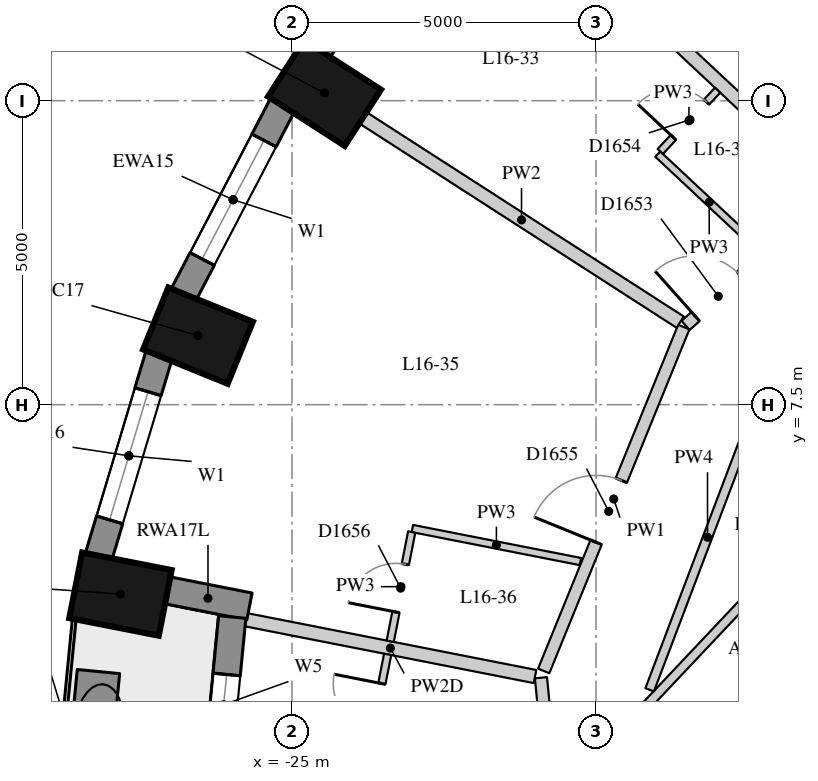
"""IFC4 building model, lengths in metres.
Left out: names, types, materials, properties, quantities, classifications, styles, units other than length and angle.
Written with IfcOpenShell. Run it as: python <this file> out.ifc"""

import sys

from ifc_helpers import new_model, si_unit, direction, frame, frame_2d, origin, origin_2d, place, context, subcontext, project, spatial, rectangle, extrude, element, fill, save


model = new_model("IFC4")
c1 = context("Model", 3, precision=1e-05, world=origin(), true_north=direction((0.0, 1.0)))
c2 = subcontext(c1, "Body", "Model", "MODEL_VIEW")
j1 = project(units=[si_unit("LENGTHUNIT", "METRE"), si_unit("PLANEANGLEUNIT", "RADIAN")], contexts=[c1])
p1 = place(None, origin())
s1 = spatial("IfcSite", under=j1, at=p1, CompositionType="ELEMENT")
p2 = place(p1, origin())
s2 = spatial("IfcBuilding", under=s1, at=p2, CompositionType="ELEMENT")
p3 = place(p2, frame((0.0, 0.0, 61.3)))
s3 = spatial("IfcBuildingStorey", under=s2, at=p3, CompositionType="ELEMENT", Elevation=61.3)
for number, where, z_axis, x_axis in (
    (1, (-24.465, 12.625, 0.0), (0.0, 0.0, 1.0), (-0.841, 0.541, 0.0)),
    (2, (-26.546, 8.636, 0.0), (0.0, 0.0, 1.0), (-0.927, 0.376, 0.0)),
    (3, (-27.821, 4.385, 0.0), (0.0, 0.0, 1.0), (-0.981, 0.193, 0.0)),
):
    element("IfcColumn", number, at=place(p3, frame(where, z_axis=z_axis, x_axis=x_axis)), inside=s3, PredefinedType="COLUMN", context=c2, shape_type="SweptSolid", body=[
        extrude(rectangle(XDim=1.5, YDim=1.1, at=origin_2d()), origin(), (0.0, 0.0, 1.0), 3.3),
    ])
p4 = place(p3, frame((-22.352, 16.17, 0.0), z_axis=(0.0, 0.0, 1.0), x_axis=(-0.616661975264, -0.787228053529, 0.0)))
e4 = element("IfcWall", 4, at=p4, inside=s3, PredefinedType="SOLIDWALL", context=c2, shape_type="SweptSolid", body=[
    extrude(rectangle(XDim=3.61, YDim=0.45, at=frame_2d((1.805, 0.0))), origin(), (0.0, 0.0, 1.0), 3.02),
])
p5 = place(p4, frame((0.705, 0.0, 0.4)))
e5 = element("IfcOpeningElement", 5, at=p5, cuts=e4, PredefinedType="OPENING", context=c2, shape_type="SweptSolid", body=[
    extrude(rectangle(XDim=2.2, YDim=1.75, at=frame_2d((1.1, 0.875))), frame((0.0, 0.235, 0.0), z_axis=(0.0, -1.0, 0.0), x_axis=(1.0, 0.0, 0.0)), (0.0, 0.0, 1.0), 0.47),
])
p6 = place(p3, frame((-25.152, 12.437, 0.0), z_axis=(0.0, 0.0, 1.0), x_axis=(-0.462492775226, -0.886623050041, 0.0)))
e6 = element("IfcWall", 6, at=p6, inside=s3, PredefinedType="SOLIDWALL", context=c2, shape_type="SweptSolid", body=[
    extrude(rectangle(XDim=3.532, YDim=0.45, at=frame_2d((1.766, 0.0))), origin(), (0.0, 0.0, 1.0), 3.02),
])
p7 = place(p6, frame((0.666, 0.0, 0.4)))
e7 = element("IfcOpeningElement", 7, at=p7, cuts=e6, PredefinedType="OPENING", context=c2, shape_type="SweptSolid", body=[
    extrude(rectangle(XDim=2.2, YDim=1.75, at=frame_2d((1.1, 0.875))), frame((0.0, 0.235, 0.0), z_axis=(0.0, -1.0, 0.0), x_axis=(1.0, 0.0, 0.0)), (0.0, 0.0, 1.0), 0.47),
])
p8 = place(p3, frame((-27.185, 8.323, 0.0), z_axis=(0.0, 0.0, 1.0), x_axis=(-0.287064133733, -0.957911364963, 0.0)))
e8 = element("IfcWall", 8, at=p8, inside=s3, PredefinedType="SOLIDWALL", context=c2, shape_type="SweptSolid", body=[
    extrude(rectangle(XDim=3.473, YDim=0.45, at=frame_2d((1.737, 0.0))), origin(), (0.0, 0.0, 1.0), 3.02),
])
p9 = place(p8, frame((0.637, 0.0, 0.4)))
e9 = element("IfcOpeningElement", 9, at=p9, cuts=e8, PredefinedType="OPENING", context=c2, shape_type="SweptSolid", body=[
    extrude(rectangle(XDim=2.2, YDim=1.75, at=frame_2d((1.1, 0.875))), frame((0.0, 0.235, 0.0), z_axis=(0.0, -1.0, 0.0), x_axis=(1.0, 0.0, 0.0)), (0.0, 0.0, 1.0), 0.47),
])
p10 = place(p3, frame((-27.064, 4.45, 0.0), z_axis=(0.0, 0.0, 1.0), x_axis=(0.98123042829, -0.192838913596, 0.0)))
e10 = element("IfcWall", 10, at=p10, inside=s3, PredefinedType="SOLIDWALL", context=c2, shape_type="SweptSolid", body=[
    extrude(rectangle(XDim=1.39, YDim=0.45, at=frame_2d((0.695, 0.0))), origin(), (0.0, 0.0, 1.0), 2.47),
])
p11 = place(p3, frame((-25.983, 4.008, 0.0), z_axis=(0.0, 0.0, 1.0), x_axis=(-0.097133468736, -0.995271364629, 0.0)))
e11 = element("IfcWall", 11, at=p11, inside=s3, PredefinedType="SOLIDWALL", context=c2, shape_type="SweptSolid", body=[
    extrude(rectangle(XDim=4.049, YDim=0.45, at=frame_2d((2.024, 0.0))), origin(), (0.0, 0.0, 1.0), 3.02),
])
p12 = place(p11, frame((0.949, 0.0, 0.4)))
e12 = element("IfcOpeningElement", 12, at=p12, cuts=e11, PredefinedType="OPENING", context=c2, shape_type="SweptSolid", body=[
    extrude(rectangle(XDim=1.0, YDim=1.75, at=frame_2d((0.5, 0.875))), frame((0.0, 0.235, 0.0), z_axis=(0.0, -1.0, 0.0), x_axis=(1.0, 0.0, 0.0)), (0.0, 0.0, 1.0), 0.47),
])
p13 = place(p11, frame((2.1, 0.0, 0.0)))
e13 = element("IfcOpeningElement", 13, at=p13, cuts=e11, PredefinedType="OPENING", context=c2, shape_type="SweptSolid", body=[
    extrude(rectangle(XDim=1.0, YDim=2.15, at=frame_2d((0.5, 1.075))), frame((0.0, 0.235, 0.0), z_axis=(0.0, -1.0, 0.0), x_axis=(1.0, 0.0, 0.0)), (0.0, 0.0, 1.0), 0.47),
])
p14 = place(p3, frame((-28.183, 3.111, 0.0), z_axis=(0.0, 0.0, 1.0), x_axis=(-0.097381768628, -0.995247100543, 0.0)))
e14 = element("IfcWall", 14, at=p14, inside=s3, PredefinedType="USERDEFINED", context=c2, shape_type="SweptSolid", body=[
    extrude(rectangle(XDim=1.8, YDim=0.7, at=frame_2d((0.9, 0.0))), origin(), (0.0, 0.0, 1.0), 0.75),
])
p15 = place(p3, frame((-20.034, -5.858, 0.0), z_axis=(0.0, 0.0, 1.0), x_axis=(-0.097894942705, 0.995196754513, 0.0)))
e15 = element("IfcWall", 15, at=p15, inside=s3, PredefinedType="PARTITIONING", context=c2, shape_type="SweptSolid", body=[
    extrude(rectangle(XDim=8.911, YDim=0.2, at=frame_2d((4.455, 0.0))), origin(), (0.0, 0.0, 1.0), 3.02),
])
p16 = place(p15, frame((5.565, 0.0, 0.0)))
e16 = element("IfcOpeningElement", 16, at=p16, cuts=e15, PredefinedType="OPENING", context=c2, shape_type="SweptSolid", body=[
    extrude(rectangle(XDim=1.1, YDim=2.1, at=frame_2d((0.55, 1.05))), frame((0.0, 0.11, 0.0), z_axis=(0.0, -1.0, 0.0), x_axis=(1.0, 0.0, 0.0)), (0.0, 0.0, 1.0), 0.22),
])
p17 = place(p15, frame((1.044, 0.0, 0.0)))
e17 = element("IfcOpeningElement", 17, at=p17, cuts=e15, PredefinedType="OPENING", context=c2, shape_type="SweptSolid", body=[
    extrude(rectangle(XDim=0.9, YDim=2.1, at=frame_2d((0.45, 1.05))), frame((0.0, 0.11, 0.0), z_axis=(0.0, -1.0, 0.0), x_axis=(1.0, 0.0, 0.0)), (0.0, 0.0, 1.0), 0.22),
])
p18 = place(p3, frame((-20.861, 3.121, 0.0), z_axis=(0.0, 0.0, 1.0), x_axis=(0.377214346955, 0.926125983034, 0.0)))
e18 = element("IfcWall", 18, at=p18, inside=s3, PredefinedType="PARTITIONING", context=c2, shape_type="SweptSolid", body=[
    extrude(rectangle(XDim=6.107, YDim=0.2, at=frame_2d((3.054, 0.0))), origin(), (0.0, 0.0, 1.0), 3.02),
])
p19 = place(p18, frame((2.285, 0.0, 0.0)))
e19 = element("IfcOpeningElement", 19, at=p19, cuts=e18, PredefinedType="OPENING", context=c2, shape_type="SweptSolid", body=[
    extrude(rectangle(XDim=1.1, YDim=2.1, at=frame_2d((0.55, 1.05))), frame((0.0, 0.11, 0.0), z_axis=(0.0, -1.0, 0.0), x_axis=(1.0, 0.0, 0.0)), (0.0, 0.0, 1.0), 0.22),
])
p20 = place(p3, frame((-18.527, 8.804, 0.0), z_axis=(0.0, 0.0, 1.0), x_axis=(0.746493000154, 0.665393267716, 0.0)))
e20 = element("IfcWall", 20, at=p20, inside=s3, PredefinedType="PARTITIONING", context=c2, shape_type="SweptSolid", body=[
    extrude(rectangle(XDim=3.251, YDim=0.2, at=frame_2d((1.625, 0.0))), origin(), (0.0, 0.0, 1.0), 3.02),
])
p21 = place(p20, frame((0.22, 0.0, 0.0)))
e21 = element("IfcOpeningElement", 21, at=p21, cuts=e20, PredefinedType="OPENING", context=c2, shape_type="SweptSolid", body=[
    extrude(rectangle(XDim=1.0, YDim=2.1, at=frame_2d((0.5, 1.05))), frame((0.0, 0.11, 0.0), z_axis=(0.0, -1.0, 0.0), x_axis=(1.0, 0.0, 0.0)), (0.0, 0.0, 1.0), 0.22),
])
p22 = place(p3, frame((-14.499, 7.501, 0.0), z_axis=(0.0, 0.0, 1.0), x_axis=(-0.686403699782, -0.727220709913, 0.0)))
e22 = element("IfcWall", 22, at=p22, inside=s3, PredefinedType="PARTITIONING", context=c2, shape_type="SweptSolid", body=[
    extrude(rectangle(XDim=6.915, YDim=0.15, at=frame_2d((3.457, 0.0))), origin(), (0.0, 0.0, 1.0), 3.02),
])
p23 = place(p3, frame((-19.118, 2.811, 0.0), z_axis=(0.0, 0.0, 1.0), x_axis=(0.35451573991, 0.935050046872, 0.0)))
e23 = element("IfcWall", 23, at=p23, inside=s3, PredefinedType="PARTITIONING", context=c2, shape_type="SweptSolid", body=[
    extrude(rectangle(XDim=5.367, YDim=0.15, at=frame_2d((2.684, 0.0))), origin(), (0.0, 0.0, 1.0), 3.02),
])
p24 = place(p3, frame((-21.093, 15.718, 0.0), z_axis=(0.0, 0.0, 1.0), x_axis=(0.73009284205, -0.683347965525, 0.0)))
e24 = element("IfcWall", 24, at=p24, inside=s3, PredefinedType="PARTITIONING", context=c2, shape_type="SweptSolid", body=[
    extrude(rectangle(XDim=6.602, YDim=0.22, at=frame_2d((3.301, 0.0))), origin(), (0.0, 0.0, 1.0), 3.02),
])
p25 = place(p3, frame((-23.835, 12.219, 0.0), z_axis=(0.0, 0.0, 1.0), x_axis=(0.840743714791, -0.541433288633, 0.0)))
e25 = element("IfcWall", 25, at=p25, inside=s3, PredefinedType="PARTITIONING", context=c2, shape_type="SweptSolid", body=[
    extrude(rectangle(XDim=6.207, YDim=0.22, at=frame_2d((3.104, 0.0))), origin(), (0.0, 0.0, 1.0), 3.02),
])
p26 = place(p3, frame((-25.761, 3.964, 0.0), z_axis=(0.0, 0.0, 1.0), x_axis=(0.981216494224, -0.192909801364, 0.0)))
e26 = element("IfcWall", 26, at=p26, inside=s3, PredefinedType="PARTITIONING", context=c2, shape_type="SweptSolid", body=[
    extrude(rectangle(XDim=4.848, YDim=0.22, at=frame_2d((2.424, 0.0))), origin(), (0.0, 0.0, 1.0), 2.47),
])
p27 = place(p3, frame((-17.293, 10.038, 0.0), z_axis=(0.0, 0.0, 1.0), x_axis=(-0.730059424734, 0.683383667026, 0.0)))
e27 = element("IfcWall", 27, at=p27, inside=s3, PredefinedType="PARTITIONING", context=c2, shape_type="SweptSolid", body=[
    extrude(rectangle(XDim=2.317, YDim=0.12, at=frame_2d((1.159, 0.0))), origin(), (0.0, 0.0, 1.0), 3.02),
])
p28 = place(p3, frame((-20.257, 4.92, 0.0), z_axis=(0.0, 0.0, 1.0), x_axis=(-0.981202530622, 0.192980812261, 0.0)))
e28 = element("IfcWall", 28, at=p28, inside=s3, PredefinedType="PARTITIONING", context=c2, shape_type="SweptSolid", body=[
    extrude(rectangle(XDim=2.816, YDim=0.12, at=frame_2d((1.408, 0.0))), origin(), (0.0, 0.0, 1.0), 3.02),
])
p29 = place(p3, frame((-18.943, 11.665, 0.0), z_axis=(0.0, 0.0, 1.0), x_axis=(0.683364094355, 0.730077745549, 0.0)))
e29 = element("IfcWall", 29, at=p29, inside=s3, PredefinedType="PARTITIONING", context=c2, shape_type="SweptSolid", body=[
    extrude(rectangle(XDim=1.38, YDim=0.12, at=frame_2d((0.69, 0.0))), origin(), (0.0, 0.0, 1.0), 3.02),
])
p30 = place(p29, frame((0.315, 0.0, 0.0)))
e30 = element("IfcOpeningElement", 30, at=p30, cuts=e29, PredefinedType="OPENING", context=c2, shape_type="SweptSolid", body=[
    extrude(rectangle(XDim=0.8, YDim=2.1, at=frame_2d((0.4, 1.05))), frame((0.0, 0.07, 0.0), z_axis=(0.0, -1.0, 0.0), x_axis=(1.0, 0.0, 0.0)), (0.0, 0.0, 1.0), 0.14),
])
p31 = place(p3, frame((-23.032, 5.405, 0.0), z_axis=(0.0, 0.0, 1.0), x_axis=(-0.19288291118, -0.981221780524, 0.0)))
e31 = element("IfcWall", 31, at=p31, inside=s3, PredefinedType="PARTITIONING", context=c2, shape_type="SweptSolid", body=[
    extrude(rectangle(XDim=1.83, YDim=0.12, at=frame_2d((0.915, 0.0))), origin(), (0.0, 0.0, 1.0), 3.02),
])
p32 = place(p31, frame((0.54, 0.0, 0.0)))
e32 = element("IfcOpeningElement", 32, at=p32, cuts=e31, PredefinedType="OPENING", context=c2, shape_type="SweptSolid", body=[
    extrude(rectangle(XDim=0.8, YDim=2.1, at=frame_2d((0.4, 1.05))), frame((0.0, 0.07, 0.0), z_axis=(0.0, -1.0, 0.0), x_axis=(1.0, 0.0, 0.0)), (0.0, 0.0, 1.0), 0.14),
])
p33 = place(p3, frame((-23.781, 1.598, 0.0), z_axis=(0.0, 0.0, 1.0), x_axis=(0.193036598643, 0.981191557029, 0.0)))
e33 = element("IfcWall", 33, at=p33, inside=s3, PredefinedType="PARTITIONING", context=c2, shape_type="SweptSolid", body=[
    extrude(rectangle(XDim=1.83, YDim=0.12, at=frame_2d((0.915, 0.0))), origin(), (0.0, 0.0, 1.0), 3.02),
])
p34 = place(p33, frame((0.54, 0.0, 0.0)))
e34 = element("IfcOpeningElement", 34, at=p34, cuts=e33, PredefinedType="OPENING", context=c2, shape_type="SweptSolid", body=[
    extrude(rectangle(XDim=0.8, YDim=2.1, at=frame_2d((0.4, 1.05))), frame((0.0, 0.07, 0.0), z_axis=(0.0, -1.0, 0.0), x_axis=(1.0, 0.0, 0.0)), (0.0, 0.0, 1.0), 0.14),
])
p35 = place(p7, origin())
e35 = element("IfcWindow", 35, at=p35, inside=s3, PartitioningType="SINGLE_PANEL", PredefinedType="WINDOW", context=c2, shape_type="SweptSolid", body=[
    extrude(rectangle(XDim=2.2, YDim=1.75, at=frame_2d((1.1, 0.875))), frame((0.0, 0.035, 0.0), z_axis=(0.0, -1.0, 0.0), x_axis=(1.0, 0.0, 0.0)), (0.0, 0.0, 1.0), 0.06),
])
fill(e7, e35)
p36 = place(p9, origin())
e36 = element("IfcWindow", 36, at=p36, inside=s3, PartitioningType="SINGLE_PANEL", PredefinedType="WINDOW", context=c2, shape_type="SweptSolid", body=[
    extrude(rectangle(XDim=2.2, YDim=1.75, at=frame_2d((1.1, 0.875))), frame((0.0, 0.035, 0.0), z_axis=(0.0, -1.0, 0.0), x_axis=(1.0, 0.0, 0.0)), (0.0, 0.0, 1.0), 0.06),
])
fill(e9, e36)
p37 = place(p12, origin())
e37 = element("IfcWindow", 37, at=p37, inside=s3, PartitioningType="SINGLE_PANEL", PredefinedType="WINDOW", context=c2, shape_type="SweptSolid", body=[
    extrude(rectangle(XDim=1.0, YDim=1.75, at=frame_2d((0.5, 0.875))), frame((0.0, 0.035, 0.0), z_axis=(0.0, -1.0, 0.0), x_axis=(1.0, 0.0, 0.0)), (0.0, 0.0, 1.0), 0.06),
])
fill(e12, e37)
p38 = place(p21, origin())
e38 = element("IfcDoor", 38, at=p38, inside=s3, OperationType="SINGLE_SWING_LEFT", PredefinedType="DOOR", context=c2, shape_type="SweptSolid", body=[
    extrude(rectangle(XDim=1.0, YDim=2.1, at=frame_2d((0.5, 1.05))), frame((0.0, 0.025, 0.0), z_axis=(0.0, -1.0, 0.0), x_axis=(1.0, 0.0, 0.0)), (0.0, 0.0, 1.0), 0.05),
])
fill(e21, e38)
p39 = place(p30, origin())
e39 = element("IfcDoor", 39, at=p39, inside=s3, OperationType="SINGLE_SWING_LEFT", PredefinedType="DOOR", context=c2, shape_type="SweptSolid", body=[
    extrude(rectangle(XDim=0.8, YDim=2.1, at=frame_2d((0.4, 1.05))), frame((0.0, 0.025, 0.0), z_axis=(0.0, -1.0, 0.0), x_axis=(1.0, 0.0, 0.0)), (0.0, 0.0, 1.0), 0.05),
])
fill(e30, e39)
p40 = place(p19, origin())
e40 = element("IfcDoor", 40, at=p40, inside=s3, OperationType="SINGLE_SWING_LEFT", PredefinedType="DOOR", context=c2, shape_type="SweptSolid", body=[
    extrude(rectangle(XDim=1.1, YDim=2.1, at=frame_2d((0.55, 1.05))), frame((0.0, 0.025, 0.0), z_axis=(0.0, -1.0, 0.0), x_axis=(1.0, 0.0, 0.0)), (0.0, 0.0, 1.0), 0.05),
])
fill(e19, e40)
p41 = place(p32, origin())
e41 = element("IfcDoor", 41, at=p41, inside=s3, OperationType="SINGLE_SWING_LEFT", PredefinedType="DOOR", context=c2, shape_type="SweptSolid", body=[
    extrude(rectangle(XDim=0.8, YDim=2.1, at=frame_2d((0.4, 1.05))), frame((0.0, 0.025, 0.0), z_axis=(0.0, -1.0, 0.0), x_axis=(1.0, 0.0, 0.0)), (0.0, 0.0, 1.0), 0.05),
])
fill(e32, e41)
p42 = place(p34, origin())
e42 = element("IfcDoor", 42, at=p42, inside=s3, OperationType="SINGLE_SWING_RIGHT", PredefinedType="DOOR", context=c2, shape_type="SweptSolid", body=[
    extrude(rectangle(XDim=0.8, YDim=2.1, at=frame_2d((0.4, 1.05))), frame((0.0, 0.025, 0.0), z_axis=(0.0, -1.0, 0.0), x_axis=(1.0, 0.0, 0.0)), (0.0, 0.0, 1.0), 0.05),
])
fill(e34, e42)
save(model, sys.argv[1])
